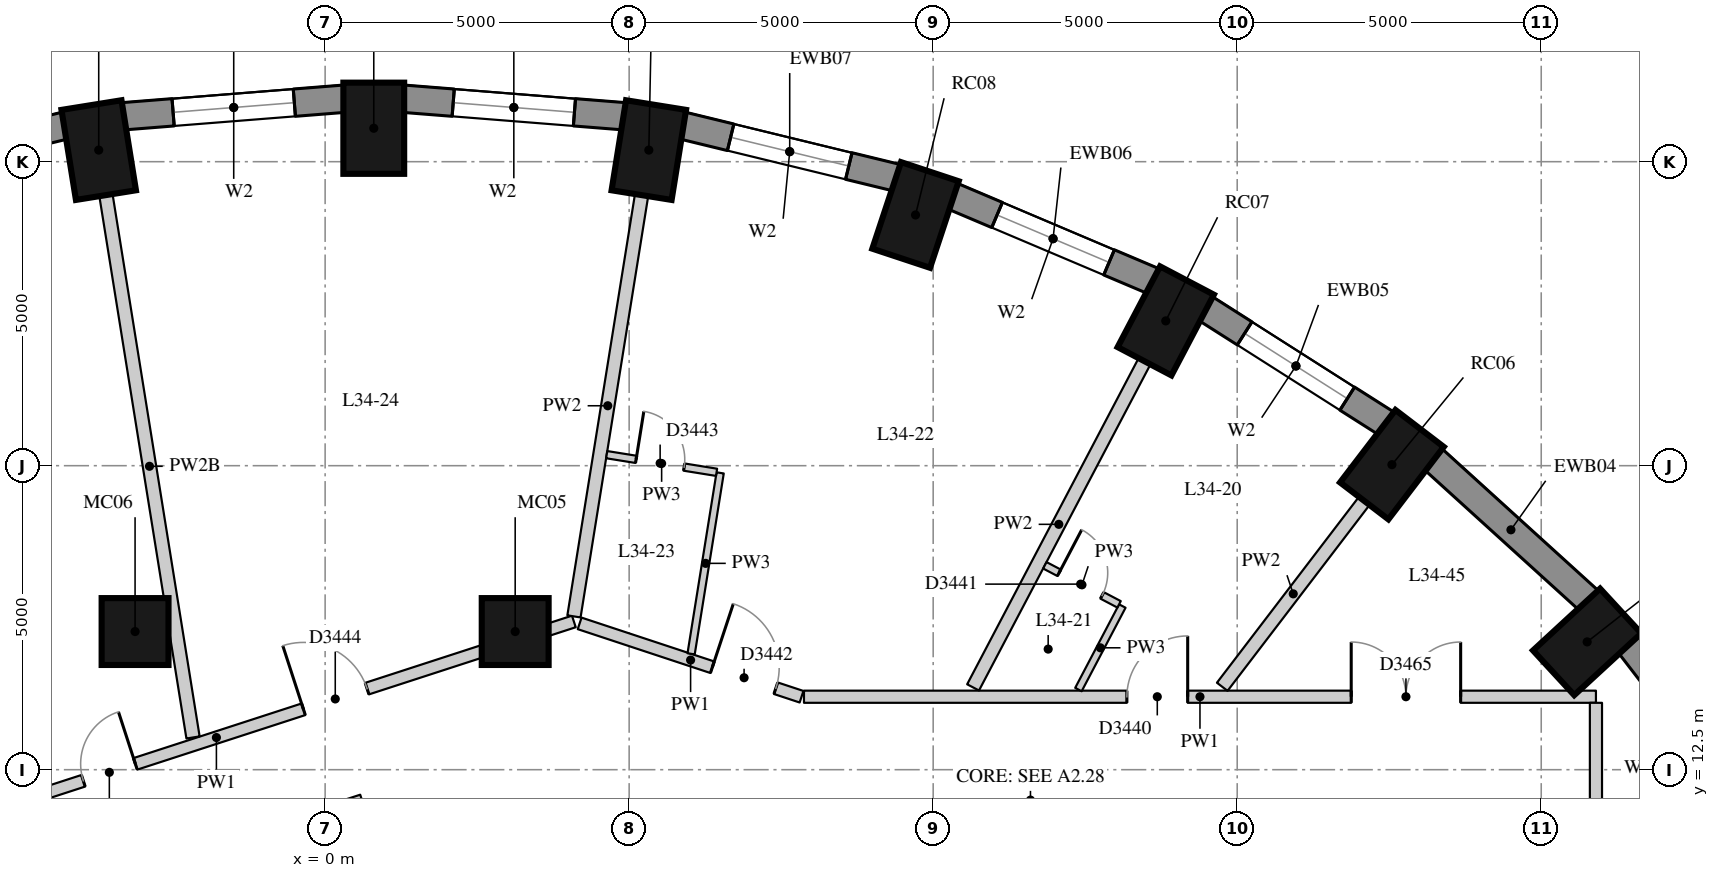
"""IFC4 building model, lengths in metres.
Left out: names, types, materials, properties, quantities, classifications, styles, units other than length and angle.
Written with IfcOpenShell. Run it as: python <this file> out.ifc"""

import sys

from ifc_helpers import new_model, si_unit, direction, frame, frame_2d, origin, origin_2d, place, context, subcontext, project, spatial, rectangle, extrude, element, fill, save


model = new_model("IFC4")
c1 = context("Model", 3, precision=1e-05, world=origin(), true_north=direction((0.0, 1.0)))
c2 = subcontext(c1, "Body", "Model", "MODEL_VIEW")
j1 = project(units=[si_unit("LENGTHUNIT", "METRE"), si_unit("PLANEANGLEUNIT", "RADIAN")], contexts=[c1])
p1 = place(None, origin())
s1 = spatial("IfcSite", under=j1, at=p1, CompositionType="ELEMENT")
p2 = place(p1, origin())
s2 = spatial("IfcBuilding", under=s1, at=p2, CompositionType="ELEMENT")
p3 = place(p2, frame((0.0, 0.0, 121.9)))
s3 = spatial("IfcBuildingStorey", under=s2, at=p3, CompositionType="ELEMENT", Elevation=121.9)
for number, where, z_axis, x_axis in (
    (1, (20.755, 14.602, 0.0), (0.0, 0.0, 1.0), (0.735, 0.678, 0.0)),
    (2, (17.545, 17.517, 0.0), (0.0, 0.0, 1.0), (0.607, 0.795, 0.0)),
    (3, (13.825, 19.882, 0.0), (0.0, 0.0, 1.0), (0.465, 0.885, 0.0)),
    (4, (9.71, 21.624, 0.0), (0.0, 0.0, 1.0), (0.315, 0.949, 0.0)),
    (5, (5.323, 22.691, 0.0), (0.0, 0.0, 1.0), (0.159, 0.987, 0.0)),
    (6, (0.8, 23.05, 0.0), (0.0, 0.0, 1.0), (0.0, 1.0, 0.0)),
    (7, (-3.724, 22.691, 0.0), (0.0, 0.0, 1.0), (-0.159, 0.987, 0.0)),
):
    element("IfcColumn", number, at=place(p3, frame(where, z_axis=z_axis, x_axis=x_axis)), inside=s3, PredefinedType="COLUMN", context=c2, shape_type="SweptSolid", body=[
        extrude(rectangle(XDim=1.5, YDim=1.0, at=origin_2d()), origin(), (0.0, 0.0, 1.0), 3.3),
    ])
for number, where, z_axis, x_axis in (
    (8, (3.126, 14.772, 0.0), (0.0, 0.0, 1.0), (1.0, 0.0, 0.0)),
    (9, (-3.126, 14.772, 0.0), (0.0, 0.0, 1.0), (1.0, 0.0, 0.0)),
):
    element("IfcColumn", number, at=place(p3, frame(where, z_axis=z_axis, x_axis=x_axis)), inside=s3, PredefinedType="COLUMN", context=c2, shape_type="SweptSolid", body=[
        extrude(rectangle(XDim=1.1, YDim=1.1, at=origin_2d()), origin(), (0.0, 0.0, 1.0), 3.3),
    ])
p4 = place(p3, frame((23.508, 11.887, 0.0), z_axis=(0.0, 0.0, 1.0), x_axis=(-0.610693945156, 0.791866721961, 0.0)))
e10 = element("IfcWall", 10, at=p4, inside=s3, PredefinedType="SOLIDWALL", context=c2, shape_type="SweptSolid", body=[
    extrude(rectangle(XDim=3.395, YDim=0.45, at=frame_2d((1.697, 0.0))), origin(), (0.0, 0.0, 1.0), 3.02),
])
p5 = place(p4, frame((1.397, 0.0, 0.4)))
e11 = element("IfcOpeningElement", 11, at=p5, cuts=e10, PredefinedType="OPENING", context=c2, shape_type="SweptSolid", body=[
    extrude(rectangle(XDim=0.6, YDim=1.75, at=frame_2d((0.3, 0.875))), frame((0.0, 0.235, 0.0), z_axis=(0.0, -1.0, 0.0), x_axis=(1.0, 0.0, 0.0)), (0.0, 0.0, 1.0), 0.47),
])
p6 = place(p3, frame((20.784, 15.281, 0.0), z_axis=(0.0, 0.0, 1.0), x_axis=(-0.74032902847, 0.672244694739, 0.0)))
e12 = element("IfcWall", 12, at=p6, inside=s3, PredefinedType="SOLIDWALL", context=c2, shape_type="SweptSolid", body=[
    extrude(rectangle(XDim=3.464, YDim=0.45, at=frame_2d((1.732, 0.0))), origin(), (0.0, 0.0, 1.0), 3.02),
])
p7 = place(p3, frame((17.456, 18.192, 0.0), z_axis=(0.0, 0.0, 1.0), x_axis=(-0.843880549131, 0.536531097699, 0.0)))
e13 = element("IfcWall", 13, at=p7, inside=s3, PredefinedType="SOLIDWALL", context=c2, shape_type="SweptSolid", body=[
    extrude(rectangle(XDim=3.532, YDim=0.45, at=frame_2d((1.766, 0.0))), origin(), (0.0, 0.0, 1.0), 3.02),
])
p8 = place(p7, frame((0.766, 0.0, 0.4)))
e14 = element("IfcOpeningElement", 14, at=p8, cuts=e13, PredefinedType="OPENING", context=c2, shape_type="SweptSolid", body=[
    extrude(rectangle(XDim=2.0, YDim=1.75, at=frame_2d((1.0, 0.875))), frame((0.0, 0.235, 0.0), z_axis=(0.0, -1.0, 0.0), x_axis=(1.0, 0.0, 0.0)), (0.0, 0.0, 1.0), 0.47),
])
p9 = place(p3, frame((13.625, 20.533, 0.0), z_axis=(0.0, 0.0, 1.0), x_axis=(-0.920869643542, 0.389870619055, 0.0)))
e15 = element("IfcWall", 15, at=p9, inside=s3, PredefinedType="SOLIDWALL", context=c2, shape_type="SweptSolid", body=[
    extrude(rectangle(XDim=3.591, YDim=0.45, at=frame_2d((1.796, 0.0))), origin(), (0.0, 0.0, 1.0), 3.02),
])
p10 = place(p9, frame((0.796, 0.0, 0.4)))
e16 = element("IfcOpeningElement", 16, at=p10, cuts=e15, PredefinedType="OPENING", context=c2, shape_type="SweptSolid", body=[
    extrude(rectangle(XDim=2.0, YDim=1.75, at=frame_2d((1.0, 0.875))), frame((0.0, 0.235, 0.0), z_axis=(0.0, -1.0, 0.0), x_axis=(1.0, 0.0, 0.0)), (0.0, 0.0, 1.0), 0.47),
])
p11 = place(p3, frame((9.406, 22.235, 0.0), z_axis=(0.0, 0.0, 1.0), x_axis=(-0.971667603162, 0.236351579148, 0.0)))
e17 = element("IfcWall", 17, at=p11, inside=s3, PredefinedType="SOLIDWALL", context=c2, shape_type="SweptSolid", body=[
    extrude(rectangle(XDim=3.635, YDim=0.45, at=frame_2d((1.817, 0.0))), origin(), (0.0, 0.0, 1.0), 3.02),
])
p12 = place(p11, frame((0.817, 0.0, 0.4)))
e18 = element("IfcOpeningElement", 18, at=p12, cuts=e17, PredefinedType="OPENING", context=c2, shape_type="SweptSolid", body=[
    extrude(rectangle(XDim=2.0, YDim=1.75, at=frame_2d((1.0, 0.875))), frame((0.0, 0.235, 0.0), z_axis=(0.0, -1.0, 0.0), x_axis=(1.0, 0.0, 0.0)), (0.0, 0.0, 1.0), 0.47),
])
p13 = place(p3, frame((4.927, 23.247, 0.0), z_axis=(0.0, 0.0, 1.0), x_axis=(-0.996862216754, 0.079156306178, 0.0)))
e19 = element("IfcWall", 19, at=p13, inside=s3, PredefinedType="SOLIDWALL", context=c2, shape_type="SweptSolid", body=[
    extrude(rectangle(XDim=3.658, YDim=0.45, at=frame_2d((1.829, 0.0))), origin(), (0.0, 0.0, 1.0), 3.02),
])
p14 = place(p13, frame((0.829, 0.0, 0.4)))
e20 = element("IfcOpeningElement", 20, at=p14, cuts=e19, PredefinedType="OPENING", context=c2, shape_type="SweptSolid", body=[
    extrude(rectangle(XDim=2.0, YDim=1.75, at=frame_2d((1.0, 0.875))), frame((0.0, 0.235, 0.0), z_axis=(0.0, -1.0, 0.0), x_axis=(1.0, 0.0, 0.0)), (0.0, 0.0, 1.0), 0.47),
])
p15 = place(p3, frame((0.32, 23.536, 0.0), z_axis=(0.0, 0.0, 1.0), x_axis=(-0.996862216754, -0.079156306178, 0.0)))
e21 = element("IfcWall", 21, at=p15, inside=s3, PredefinedType="SOLIDWALL", context=c2, shape_type="SweptSolid", body=[
    extrude(rectangle(XDim=3.658, YDim=0.45, at=frame_2d((1.829, 0.0))), origin(), (0.0, 0.0, 1.0), 3.02),
])
p16 = place(p15, frame((0.829, 0.0, 0.4)))
e22 = element("IfcOpeningElement", 22, at=p16, cuts=e21, PredefinedType="OPENING", context=c2, shape_type="SweptSolid", body=[
    extrude(rectangle(XDim=2.0, YDim=1.75, at=frame_2d((1.0, 0.875))), frame((0.0, 0.235, 0.0), z_axis=(0.0, -1.0, 0.0), x_axis=(1.0, 0.0, 0.0)), (0.0, 0.0, 1.0), 0.47),
])
p17 = place(p3, frame((-4.275, 23.094, 0.0), z_axis=(0.0, 0.0, 1.0), x_axis=(-0.971667603162, -0.236351579148, 0.0)))
e23 = element("IfcWall", 23, at=p17, inside=s3, PredefinedType="SOLIDWALL", context=c2, shape_type="SweptSolid", body=[
    extrude(rectangle(XDim=3.635, YDim=0.45, at=frame_2d((1.817, 0.0))), origin(), (0.0, 0.0, 1.0), 3.02),
])
p18 = place(p17, frame((0.817, 0.0, 0.4)))
e24 = element("IfcOpeningElement", 24, at=p18, cuts=e23, PredefinedType="OPENING", context=c2, shape_type="SweptSolid", body=[
    extrude(rectangle(XDim=2.0, YDim=1.75, at=frame_2d((1.0, 0.875))), frame((0.0, 0.235, 0.0), z_axis=(0.0, -1.0, 0.0), x_axis=(1.0, 0.0, 0.0)), (0.0, 0.0, 1.0), 0.47),
])
p19 = place(p3, frame((-7.667, 11.119, 0.0), z_axis=(0.0, 0.0, 1.0), x_axis=(0.951088334028, 0.308919052304, 0.0)))
e25 = element("IfcWall", 25, at=p19, inside=s3, PredefinedType="PARTITIONING", context=c2, shape_type="SweptSolid", body=[
    extrude(rectangle(XDim=12.362, YDim=0.2, at=frame_2d((6.181, 0.0))), origin(), (0.0, 0.0, 1.0), 3.02),
])
p20 = place(p19, frame((7.686, 0.0, 0.0)))
e26 = element("IfcOpeningElement", 26, at=p20, cuts=e25, PredefinedType="OPENING", context=c2, shape_type="SweptSolid", body=[
    extrude(rectangle(XDim=1.1, YDim=2.1, at=frame_2d((0.55, 1.05))), frame((0.0, 0.11, 0.0), z_axis=(0.0, -1.0, 0.0), x_axis=(1.0, 0.0, 0.0)), (0.0, 0.0, 1.0), 0.22),
])
p21 = place(p19, frame((3.88, 0.0, 0.0)))
e27 = element("IfcOpeningElement", 27, at=p21, cuts=e25, PredefinedType="OPENING", context=c2, shape_type="SweptSolid", body=[
    extrude(rectangle(XDim=0.9, YDim=2.1, at=frame_2d((0.45, 1.05))), frame((0.0, 0.11, 0.0), z_axis=(0.0, -1.0, 0.0), x_axis=(1.0, 0.0, 0.0)), (0.0, 0.0, 1.0), 0.22),
])
p22 = place(p3, frame((4.186, 14.906, 0.0), z_axis=(0.0, 0.0, 1.0), x_axis=(0.94947428881, -0.313844826131, 0.0)))
e28 = element("IfcWall", 28, at=p22, inside=s3, PredefinedType="PARTITIONING", context=c2, shape_type="SweptSolid", body=[
    extrude(rectangle(XDim=3.844, YDim=0.2, at=frame_2d((1.922, 0.0))), origin(), (0.0, 0.0, 1.0), 3.02),
])
p23 = place(p22, frame((2.298, 0.0, 0.0)))
e29 = element("IfcOpeningElement", 29, at=p23, cuts=e28, PredefinedType="OPENING", context=c2, shape_type="SweptSolid", body=[
    extrude(rectangle(XDim=1.1, YDim=2.1, at=frame_2d((0.55, 1.05))), frame((0.0, 0.11, 0.0), z_axis=(0.0, -1.0, 0.0), x_axis=(1.0, 0.0, 0.0)), (0.0, 0.0, 1.0), 0.22),
])
p24 = place(p3, frame((7.875, 13.7, 0.0), z_axis=(0.0, 0.0, 1.0), x_axis=(1.0, 0.0, 0.0)))
e30 = element("IfcWall", 30, at=p24, inside=s3, PredefinedType="PARTITIONING", context=c2, shape_type="SweptSolid", body=[
    extrude(rectangle(XDim=13.025, YDim=0.2, at=frame_2d((6.512, 0.0))), origin(), (0.0, 0.0, 1.0), 3.02),
])
p25 = place(p24, frame((5.311, 0.0, 0.0)))
e31 = element("IfcOpeningElement", 31, at=p25, cuts=e30, PredefinedType="OPENING", context=c2, shape_type="SweptSolid", body=[
    extrude(rectangle(XDim=1.0, YDim=2.1, at=frame_2d((0.5, 1.05))), frame((0.0, 0.11, 0.0), z_axis=(0.0, -1.0, 0.0), x_axis=(1.0, 0.0, 0.0)), (0.0, 0.0, 1.0), 0.22),
])
p26 = place(p24, frame((9.0, 0.0, 0.0)))
e32 = element("IfcOpeningElement", 32, at=p26, cuts=e30, PredefinedType="OPENING", context=c2, shape_type="SweptSolid", body=[
    extrude(rectangle(XDim=1.8, YDim=2.1, at=frame_2d((0.9, 1.05))), frame((0.0, 0.11, 0.0), z_axis=(0.0, -1.0, 0.0), x_axis=(1.0, 0.0, 0.0)), (0.0, 0.0, 1.0), 0.22),
])
p27 = place(p3, frame((20.9, 13.6, 0.0), z_axis=(0.0, 0.0, 1.0), x_axis=(0.0, -1.0, 0.0)))
e33 = element("IfcWall", 33, at=p27, inside=s3, PredefinedType="PARTITIONING", context=c2, shape_type="SweptSolid", body=[
    extrude(rectangle(XDim=27.3, YDim=0.2, at=frame_2d((13.65, 0.0))), origin(), (0.0, 0.0, 1.0), 3.02),
])
p28 = place(p27, frame((18.433, 0.0, 0.0)))
e34 = element("IfcOpeningElement", 34, at=p28, cuts=e33, PredefinedType="OPENING", context=c2, shape_type="SweptSolid", body=[
    extrude(rectangle(XDim=1.8, YDim=2.1, at=frame_2d((0.9, 1.05))), frame((0.0, 0.11, 0.0), z_axis=(0.0, -1.0, 0.0), x_axis=(1.0, 0.0, 0.0)), (0.0, 0.0, 1.0), 0.22),
])
p29 = place(p27, frame((8.167, 0.0, 0.0)))
e35 = element("IfcOpeningElement", 35, at=p29, cuts=e33, PredefinedType="OPENING", context=c2, shape_type="SweptSolid", body=[
    extrude(rectangle(XDim=1.8, YDim=2.1, at=frame_2d((0.9, 1.05))), frame((0.0, 0.11, 0.0), z_axis=(0.0, -1.0, 0.0), x_axis=(1.0, 0.0, 0.0)), (0.0, 0.0, 1.0), 0.22),
])
p30 = place(p3, frame((-4.5, 10.361, 0.0), z_axis=(0.0, 0.0, 1.0), x_axis=(0.951090931116, 0.308911056372, 0.0)))
e36 = element("IfcWall", 36, at=p30, inside=s3, PredefinedType="PARTITIONING", context=c2, shape_type="SweptSolid", body=[
    extrude(rectangle(XDim=5.362, YDim=0.15, at=frame_2d((2.681, 0.0))), origin(), (0.0, 0.0, 1.0), 3.02),
])
p31 = place(p30, frame((2.231, 0.0, 0.0)))
e37 = element("IfcOpeningElement", 37, at=p31, cuts=e36, PredefinedType="OPENING", context=c2, shape_type="SweptSolid", body=[
    extrude(rectangle(XDim=0.9, YDim=2.1, at=frame_2d((0.45, 1.05))), frame((0.0, 0.085, 0.0), z_axis=(0.0, -1.0, 0.0), x_axis=(1.0, 0.0, 0.0)), (0.0, 0.0, 1.0), 0.17),
])
p32 = place(p3, frame((17.089, 16.921, 0.0), z_axis=(0.0, 0.0, 1.0), x_axis=(-0.607033117359, -0.794676534465, 0.0)))
e38 = element("IfcWall", 38, at=p32, inside=s3, PredefinedType="PARTITIONING", context=c2, shape_type="SweptSolid", body=[
    extrude(rectangle(XDim=3.847, YDim=0.22, at=frame_2d((1.924, 0.0))), origin(), (0.0, 0.0, 1.0), 3.02),
])
p33 = place(p3, frame((13.476, 19.218, 0.0), z_axis=(0.0, 0.0, 1.0), x_axis=(-0.465346231977, -0.885128738876, 0.0)))
e39 = element("IfcWall", 39, at=p33, inside=s3, PredefinedType="PARTITIONING", context=c2, shape_type="SweptSolid", body=[
    extrude(rectangle(XDim=6.06, YDim=0.22, at=frame_2d((3.03, 0.0))), origin(), (0.0, 0.0, 1.0), 3.02),
])
p34 = place(p3, frame((5.205, 21.95, 0.0), z_axis=(0.0, 0.0, 1.0), x_axis=(-0.158500652659, -0.987358872501, 0.0)))
e40 = element("IfcWall", 40, at=p34, inside=s3, PredefinedType="PARTITIONING", context=c2, shape_type="SweptSolid", body=[
    extrude(rectangle(XDim=7.018, YDim=0.22, at=frame_2d((3.509, 0.0))), origin(), (0.0, 0.0, 1.0), 3.02),
])
p35 = place(p3, frame((-3.605, 21.95, 0.0), z_axis=(0.0, 0.0, 1.0), x_axis=(0.158519564718, -0.987355836364, 0.0)))
e41 = element("IfcWall", 41, at=p35, inside=s3, PredefinedType="PARTITIONING", context=c2, shape_type="SweptSolid", body=[
    extrude(rectangle(XDim=9.034, YDim=0.22, at=frame_2d((4.517, 0.0))), origin(), (0.0, 0.0, 1.0), 2.57),
])
p36 = place(p3, frame((12.389, 13.818, 0.0), z_axis=(0.0, 0.0, 1.0), x_axis=(0.465305514099, 0.885150144636, 0.0)))
e42 = element("IfcWall", 42, at=p36, inside=s3, PredefinedType="PARTITIONING", context=c2, shape_type="SweptSolid", body=[
    extrude(rectangle(XDim=1.552, YDim=0.12, at=frame_2d((0.776, 0.0))), origin(), (0.0, 0.0, 1.0), 3.02),
])
p37 = place(p3, frame((6.019, 14.406, 0.0), z_axis=(0.0, 0.0, 1.0), x_axis=(0.158524395275, 0.987355060808, 0.0)))
e43 = element("IfcWall", 43, at=p37, inside=s3, PredefinedType="PARTITIONING", context=c2, shape_type="SweptSolid", body=[
    extrude(rectangle(XDim=3.014, YDim=0.12, at=frame_2d((1.507, 0.0))), origin(), (0.0, 0.0, 1.0), 3.02),
])
p38 = place(p3, frame((13.057, 15.219, 0.0), z_axis=(0.0, 0.0, 1.0), x_axis=(-0.885071735195, 0.465454641784, 0.0)))
e44 = element("IfcWall", 44, at=p38, inside=s3, PredefinedType="PARTITIONING", context=c2, shape_type="SweptSolid", body=[
    extrude(rectangle(XDim=1.379, YDim=0.12, at=frame_2d((0.69, 0.0))), origin(), (0.0, 0.0, 1.0), 3.02),
])
p39 = place(p38, frame((0.315, 0.0, 0.0)))
e45 = element("IfcOpeningElement", 45, at=p39, cuts=e44, PredefinedType="OPENING", context=c2, shape_type="SweptSolid", body=[
    extrude(rectangle(XDim=0.8, YDim=2.1, at=frame_2d((0.4, 1.05))), frame((0.0, 0.07, 0.0), z_axis=(0.0, -1.0, 0.0), x_axis=(1.0, 0.0, 0.0)), (0.0, 0.0, 1.0), 0.14),
])
p40 = place(p3, frame((6.438, 17.391, 0.0), z_axis=(0.0, 0.0, 1.0), x_axis=(-0.987336342922, 0.158640934018, 0.0)))
e46 = element("IfcWall", 46, at=p40, inside=s3, PredefinedType="PARTITIONING", context=c2, shape_type="SweptSolid", body=[
    extrude(rectangle(XDim=1.83, YDim=0.12, at=frame_2d((0.915, 0.0))), origin(), (0.0, 0.0, 1.0), 3.02),
])
p41 = place(p40, frame((0.54, 0.0, 0.0)))
e47 = element("IfcOpeningElement", 47, at=p41, cuts=e46, PredefinedType="OPENING", context=c2, shape_type="SweptSolid", body=[
    extrude(rectangle(XDim=0.8, YDim=2.1, at=frame_2d((0.4, 1.05))), frame((0.0, 0.07, 0.0), z_axis=(0.0, -1.0, 0.0), x_axis=(1.0, 0.0, 0.0)), (0.0, 0.0, 1.0), 0.14),
])
p42 = place(p8, origin())
e48 = element("IfcWindow", 48, at=p42, inside=s3, PartitioningType="SINGLE_PANEL", PredefinedType="WINDOW", context=c2, shape_type="SweptSolid", body=[
    extrude(rectangle(XDim=2.0, YDim=1.75, at=frame_2d((1.0, 0.875))), frame((0.0, 0.035, 0.0), z_axis=(0.0, -1.0, 0.0), x_axis=(1.0, 0.0, 0.0)), (0.0, 0.0, 1.0), 0.06),
])
fill(e14, e48)
p43 = place(p10, origin())
e49 = element("IfcWindow", 49, at=p43, inside=s3, PartitioningType="SINGLE_PANEL", PredefinedType="WINDOW", context=c2, shape_type="SweptSolid", body=[
    extrude(rectangle(XDim=2.0, YDim=1.75, at=frame_2d((1.0, 0.875))), frame((0.0, 0.035, 0.0), z_axis=(0.0, -1.0, 0.0), x_axis=(1.0, 0.0, 0.0)), (0.0, 0.0, 1.0), 0.06),
])
fill(e16, e49)
p44 = place(p12, origin())
e50 = element("IfcWindow", 50, at=p44, inside=s3, PartitioningType="SINGLE_PANEL", PredefinedType="WINDOW", context=c2, shape_type="SweptSolid", body=[
    extrude(rectangle(XDim=2.0, YDim=1.75, at=frame_2d((1.0, 0.875))), frame((0.0, 0.035, 0.0), z_axis=(0.0, -1.0, 0.0), x_axis=(1.0, 0.0, 0.0)), (0.0, 0.0, 1.0), 0.06),
])
fill(e18, e50)
p45 = place(p14, origin())
e51 = element("IfcWindow", 51, at=p45, inside=s3, PartitioningType="SINGLE_PANEL", PredefinedType="WINDOW", context=c2, shape_type="SweptSolid", body=[
    extrude(rectangle(XDim=2.0, YDim=1.75, at=frame_2d((1.0, 0.875))), frame((0.0, 0.035, 0.0), z_axis=(0.0, -1.0, 0.0), x_axis=(1.0, 0.0, 0.0)), (0.0, 0.0, 1.0), 0.06),
])
fill(e20, e51)
p46 = place(p16, origin())
e52 = element("IfcWindow", 52, at=p46, inside=s3, PartitioningType="SINGLE_PANEL", PredefinedType="WINDOW", context=c2, shape_type="SweptSolid", body=[
    extrude(rectangle(XDim=2.0, YDim=1.75, at=frame_2d((1.0, 0.875))), frame((0.0, 0.035, 0.0), z_axis=(0.0, -1.0, 0.0), x_axis=(1.0, 0.0, 0.0)), (0.0, 0.0, 1.0), 0.06),
])
fill(e22, e52)
p47 = place(p25, origin())
e53 = element("IfcDoor", 53, at=p47, inside=s3, OperationType="SINGLE_SWING_RIGHT", PredefinedType="DOOR", context=c2, shape_type="SweptSolid", body=[
    extrude(rectangle(XDim=1.0, YDim=2.1, at=frame_2d((0.5, 1.05))), frame((0.0, 0.025, 0.0), z_axis=(0.0, -1.0, 0.0), x_axis=(1.0, 0.0, 0.0)), (0.0, 0.0, 1.0), 0.05),
])
fill(e31, e53)
p48 = place(p39, origin())
e54 = element("IfcDoor", 54, at=p48, inside=s3, OperationType="SINGLE_SWING_LEFT", PredefinedType="DOOR", context=c2, shape_type="SweptSolid", body=[
    extrude(rectangle(XDim=0.8, YDim=2.1, at=frame_2d((0.4, 1.05))), frame((0.0, 0.025, 0.0), z_axis=(0.0, -1.0, 0.0), x_axis=(1.0, 0.0, 0.0)), (0.0, 0.0, 1.0), 0.05),
])
fill(e45, e54)
p49 = place(p23, origin())
e55 = element("IfcDoor", 55, at=p49, inside=s3, OperationType="SINGLE_SWING_LEFT", PredefinedType="DOOR", context=c2, shape_type="SweptSolid", body=[
    extrude(rectangle(XDim=1.1, YDim=2.1, at=frame_2d((0.55, 1.05))), frame((0.0, 0.025, 0.0), z_axis=(0.0, -1.0, 0.0), x_axis=(1.0, 0.0, 0.0)), (0.0, 0.0, 1.0), 0.05),
])
fill(e29, e55)
p50 = place(p41, origin())
e56 = element("IfcDoor", 56, at=p50, inside=s3, OperationType="SINGLE_SWING_LEFT", PredefinedType="DOOR", context=c2, shape_type="SweptSolid", body=[
    extrude(rectangle(XDim=0.8, YDim=2.1, at=frame_2d((0.4, 1.05))), frame((0.0, 0.025, 0.0), z_axis=(0.0, -1.0, 0.0), x_axis=(1.0, 0.0, 0.0)), (0.0, 0.0, 1.0), 0.05),
])
fill(e47, e56)
p51 = place(p20, origin())
e57 = element("IfcDoor", 57, at=p51, inside=s3, OperationType="SINGLE_SWING_LEFT", PredefinedType="DOOR", context=c2, shape_type="SweptSolid", body=[
    extrude(rectangle(XDim=1.1, YDim=2.1, at=frame_2d((0.55, 1.05))), frame((0.0, 0.025, 0.0), z_axis=(0.0, -1.0, 0.0), x_axis=(1.0, 0.0, 0.0)), (0.0, 0.0, 1.0), 0.05),
])
fill(e26, e57)
p52 = place(p21, origin())
e58 = element("IfcDoor", 58, at=p52, inside=s3, OperationType="SINGLE_SWING_RIGHT", PredefinedType="DOOR", context=c2, shape_type="SweptSolid", body=[
    extrude(rectangle(XDim=0.9, YDim=2.1, at=frame_2d((0.45, 1.05))), frame((0.0, 0.025, 0.0), z_axis=(0.0, -1.0, 0.0), x_axis=(1.0, 0.0, 0.0)), (0.0, 0.0, 1.0), 0.05),
])
fill(e27, e58)
p53 = place(p26, origin())
e59 = element("IfcDoor", 59, at=p53, inside=s3, OperationType="DOUBLE_DOOR_SINGLE_SWING", PredefinedType="DOOR", context=c2, shape_type="SweptSolid", body=[
    extrude(rectangle(XDim=1.8, YDim=2.1, at=frame_2d((0.9, 1.05))), frame((0.0, 0.025, 0.0), z_axis=(0.0, -1.0, 0.0), x_axis=(1.0, 0.0, 0.0)), (0.0, 0.0, 1.0), 0.05),
])
fill(e32, e59)
save(model, sys.argv[1])
